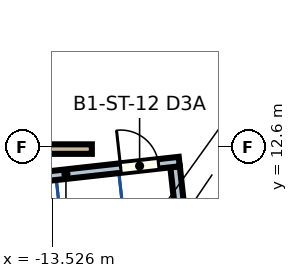
"""IFC4 building model, lengths in metres.
Left out: names, types, materials, properties, quantities, classifications, styles, units other than length and angle.
Written with IfcOpenShell. Run it as: python <this file> out.ifc"""

import sys

from ifc_helpers import new_model, si_unit, direction, frame, frame_2d, origin, place, context, subcontext, project, spatial, rectangle, extrude, element, fill, save


model = new_model("IFC4")
c1 = context("Model", 3, precision=1e-05, world=origin(), true_north=direction((0.0, 1.0)))
c2 = subcontext(c1, "Body", "Model", "MODEL_VIEW")
j1 = project(units=[si_unit("LENGTHUNIT", "METRE"), si_unit("PLANEANGLEUNIT", "RADIAN")], contexts=[c1])
p1 = place(None, origin())
s1 = spatial("IfcSite", under=j1, at=p1, CompositionType="ELEMENT")
p2 = place(p1, origin())
s2 = spatial("IfcBuilding", under=s1, at=p2, CompositionType="ELEMENT")
p3 = place(p2, frame((0.0, 0.0, -5.0)))
s3 = spatial("IfcBuildingStorey", under=s2, at=p3, CompositionType="ELEMENT", Elevation=-5.0)
p4 = place(p3, frame((-16.05, 12.6, 0.0), z_axis=(0.0, 0.0, 1.0), x_axis=(1.0, 0.0, 0.0)))
e1 = element("IfcWall", 1, at=p4, inside=s3, PredefinedType="PARTITIONING", context=c2, shape_type="SweptSolid", body=[
    extrude(rectangle(XDim=3.561, YDim=0.25, at=frame_2d((1.78, 0.0))), origin(), (0.0, 0.0, 1.0), 4.6),
])
p5 = place(p3, frame((-10.3, 12.134, 0.0), z_axis=(0.0, 0.0, 1.0), x_axis=(0.110328108544, -0.993895220063, 0.0)))
e2 = element("IfcWall", 2, at=p5, inside=s3, PredefinedType="SOLIDWALL", context=c2, shape_type="SweptSolid", body=[
    extrude(rectangle(XDim=2.85, YDim=0.25, at=frame_2d((1.425, 0.0))), origin(), (0.0, 0.0, 1.0), 4.6),
])
p6 = place(p3, frame((-16.153, 11.61, 0.0), z_axis=(0.0, 0.0, 1.0), x_axis=(0.993897125329, 0.110310943534, 0.0)))
e3 = element("IfcWall", 3, at=p6, inside=s3, PredefinedType="SOLIDWALL", context=c2, shape_type="SweptSolid", body=[
    extrude(rectangle(XDim=6.0, YDim=0.25, at=frame_2d((3.0, 0.0))), origin(), (0.0, 0.0, 1.0), 4.6),
])
p7 = place(p6, frame((4.45, 0.0, 0.0)))
e4 = element("IfcOpeningElement", 4, at=p7, cuts=e3, PredefinedType="OPENING", context=c2, shape_type="SweptSolid", body=[
    extrude(rectangle(XDim=1.0, YDim=2.1, at=frame_2d((0.5, 1.05))), frame((0.0, 0.135, 0.0), z_axis=(0.0, -1.0, 0.0), x_axis=(1.0, 0.0, 0.0)), (0.0, 0.0, 1.0), 0.27),
])
p8 = place(p7, origin())
e5 = element("IfcDoor", 5, at=p8, inside=s3, PredefinedType="DOOR", context=c2, shape_type="SweptSolid", body=[
    extrude(rectangle(XDim=1.0, YDim=2.1, at=frame_2d((0.5, 1.05))), frame((0.0, 0.025, 0.0), z_axis=(0.0, -1.0, 0.0), x_axis=(1.0, 0.0, 0.0)), (0.0, 0.0, 1.0), 0.05),
])
fill(e4, e5)
save(model, sys.argv[1])
